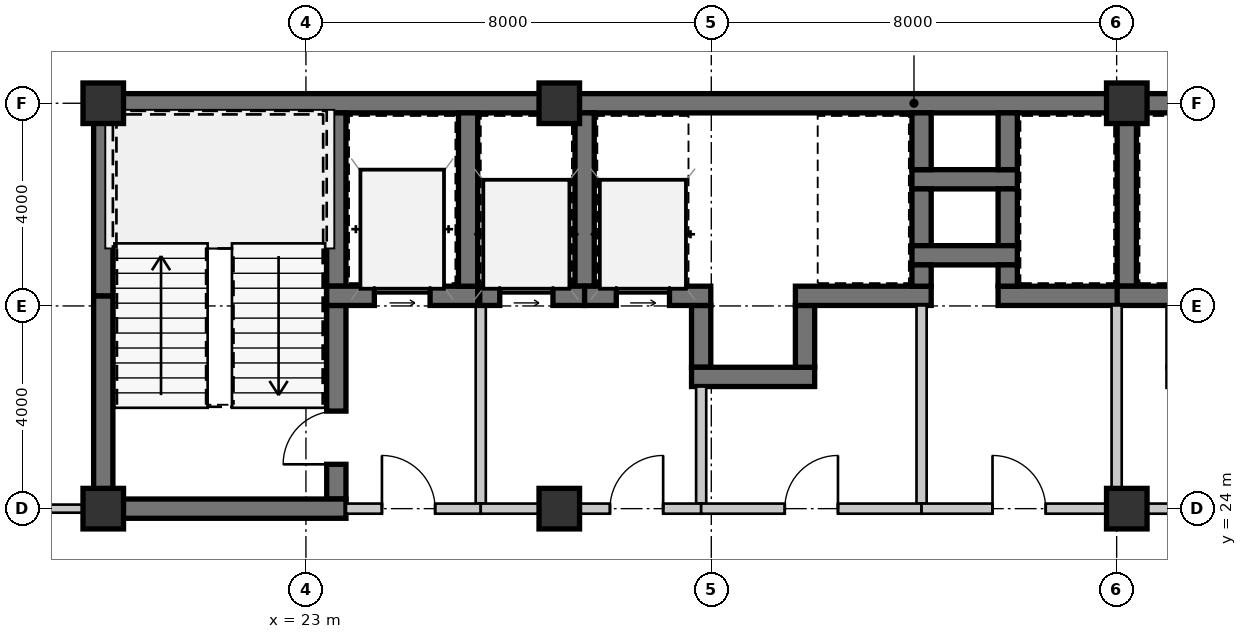
"""IFC4 building model, lengths in metres.
Left out: names, types, materials, properties, quantities, classifications, styles, units other than length and angle.
Written with IfcOpenShell. Run it as: python <this file> out.ifc"""

import sys

from ifc_helpers import new_model, si_unit, direction, frame, frame_2d, origin, origin_2d, place, context, subcontext, project, spatial, rectangle, extrude, source, transform, mapped, element, fill, save


model = new_model("IFC4")
c1 = context("Model", 3, precision=1e-05, world=origin(), true_north=direction((0.0, 1.0)))
c2 = subcontext(c1, "Body", "Model", "MODEL_VIEW")
j1 = project(units=[si_unit("LENGTHUNIT", "METRE"), si_unit("PLANEANGLEUNIT", "RADIAN")], contexts=[c1])
p1 = place(None, origin())
s1 = spatial("IfcSite", under=j1, at=p1, CompositionType="ELEMENT")
p2 = place(p1, origin())
s2 = spatial("IfcBuilding", under=s1, at=p2, CompositionType="ELEMENT")
p3 = place(p2, frame((0.0, 0.0, 19.95)))
s3 = spatial("IfcBuildingStorey", under=s2, at=p3, CompositionType="ELEMENT", Elevation=19.95)
m1 = source(origin(), c2, "Body", "SweptSolid", [
    extrude(rectangle(XDim=0.8, YDim=0.8, at=origin_2d()), origin(), (0.0, 0.0, 1.0), 3.15),
])
for number, where, z_axis, x_axis in (
    (1, (19.0, 24.0, 0.0), (0.0, 0.0, 1.0), (1.0, 0.0, 0.0)),
    (2, (28.0, 24.0, 0.0), (0.0, 0.0, 1.0), (1.0, 0.0, 0.0)),
    (3, (39.2, 24.0, 0.0), (0.0, 0.0, 1.0), (1.0, 0.0, 0.0)),
    (4, (19.0, 32.0, 0.0), (0.0, 0.0, 1.0), (1.0, 0.0, 0.0)),
    (5, (28.0, 32.0, 0.0), (0.0, 0.0, 1.0), (1.0, 0.0, 0.0)),
    (6, (39.2, 32.0, 0.0), (0.0, 0.0, 1.0), (1.0, 0.0, 0.0)),
):
    element("IfcColumn", number, at=place(p3, frame(where, z_axis=z_axis, x_axis=x_axis)), inside=s3, PredefinedType="COLUMN", context=c2, shape_type="MappedRepresentation", body=[
        mapped(m1, transform((0.0, 0.0, 0.0), scale=1.0)),
    ])
m2 = source(origin(), c2, "Body", "SweptSolid", [
    extrude(rectangle(XDim=9.19, YDim=0.38, at=frame_2d((4.595, 0.0))), origin(), (0.0, 0.0, 1.0), 2.93),
])
p4 = place(p3, frame((18.81, 32.0, 0.0), z_axis=(0.0, 0.0, 1.0), x_axis=(1.0, 0.0, 0.0)))
e7 = element("IfcWall", 7, at=p4, inside=s3, PredefinedType="SHEAR", context=c2, shape_type="MappedRepresentation", body=[
    mapped(m2, transform((0.0, 0.0, 0.0), scale=1.0)),
])
m3 = source(origin(), c2, "Body", "SweptSolid", [
    extrude(rectangle(XDim=11.2, YDim=0.38, at=frame_2d((5.6, 0.0))), origin(), (0.0, 0.0, 1.0), 2.93),
])
p5 = place(p3, frame((28.0, 32.0, 0.0), z_axis=(0.0, 0.0, 1.0), x_axis=(1.0, 0.0, 0.0)))
e8 = element("IfcWall", 8, at=p5, inside=s3, PredefinedType="SHEAR", context=c2, shape_type="MappedRepresentation", body=[
    mapped(m3, transform((0.0, 0.0, 0.0), scale=1.0)),
])
m4 = source(origin(), c2, "Body", "SweptSolid", [
    extrude(rectangle(XDim=11.99, YDim=0.38, at=frame_2d((5.995, 0.0))), origin(), (0.0, 0.0, 1.0), 2.93),
])
p6 = place(p3, frame((39.2, 32.0, 0.0), z_axis=(0.0, 0.0, 1.0), x_axis=(1.0, 0.0, 0.0)))
e9 = element("IfcWall", 9, at=p6, inside=s3, PredefinedType="SHEAR", context=c2, shape_type="MappedRepresentation", body=[
    mapped(m4, transform((0.0, 0.0, 0.0), scale=1.0)),
])
m5 = source(origin(), c2, "Body", "SweptSolid", [
    extrude(rectangle(XDim=4.01, YDim=0.38, at=frame_2d((2.005, 0.0))), origin(), (0.0, 0.0, 1.0), 2.93),
])
p7 = place(p3, frame((19.0, 24.19, 0.0), z_axis=(0.0, 0.0, 1.0), x_axis=(0.0, 1.0, 0.0)))
e10 = element("IfcWall", 10, at=p7, inside=s3, PredefinedType="SHEAR", context=c2, shape_type="MappedRepresentation", body=[
    mapped(m5, transform((0.0, 0.0, 0.0), scale=1.0)),
])
m6 = source(origin(), c2, "Body", "SweptSolid", [
    extrude(rectangle(XDim=3.61, YDim=0.38, at=frame_2d((1.805, 0.0))), origin(), (0.0, 0.0, 1.0), 2.93),
])
p8 = place(p3, frame((19.0, 28.2, 0.0), z_axis=(0.0, 0.0, 1.0), x_axis=(0.0, 1.0, 0.0)))
e11 = element("IfcWall", 11, at=p8, inside=s3, PredefinedType="SHEAR", context=c2, shape_type="MappedRepresentation", body=[
    mapped(m6, transform((0.0, 0.0, 0.0), scale=1.0)),
])
m7 = source(origin(), c2, "Body", "SweptSolid", [
    extrude(rectangle(XDim=3.42, YDim=0.38, at=frame_2d((1.71, 0.0))), origin(), (0.0, 0.0, 1.0), 2.93),
])
p9 = place(p3, frame((23.6, 28.39, 0.0), z_axis=(0.0, 0.0, 1.0), x_axis=(0.0, 1.0, 0.0)))
e12 = element("IfcWall", 12, at=p9, inside=s3, PredefinedType="SHEAR", context=c2, shape_type="MappedRepresentation", body=[
    mapped(m7, transform((0.0, 0.0, 0.0), scale=1.0)),
])
m8 = source(origin(), c2, "Body", "SweptSolid", [
    extrude(rectangle(XDim=3.82, YDim=0.38, at=frame_2d((1.91, 0.0))), origin(), (0.0, 0.0, 1.0), 2.93),
])
p10 = place(p3, frame((23.6, 24.19, 0.0), z_axis=(0.0, 0.0, 1.0), x_axis=(0.0, 1.0, 0.0)))
e13 = element("IfcWall", 13, at=p10, inside=s3, PredefinedType="SHEAR", context=c2, shape_type="MappedRepresentation", body=[
    mapped(m8, transform((0.0, 0.0, 0.0), scale=1.0)),
])
m9 = source(origin(), c2, "Body", "SweptSolid", [
    extrude(rectangle(XDim=1.05, YDim=2.1, at=frame_2d((0.525, 1.05))), frame((0.0, 0.2, 0.0), z_axis=(0.0, -1.0, 0.0), x_axis=(1.0, 0.0, 0.0)), (0.0, 0.0, 1.0), 0.4),
])
p11 = place(p10, frame((0.685, 0.0, 0.0)))
e14 = element("IfcOpeningElement", 14, at=p11, cuts=e13, PredefinedType="OPENING", context=c2, shape_type="MappedRepresentation", body=[
    mapped(m9, transform((0.0, 0.0, 0.0), scale=1.0)),
])
m10 = source(origin(), c2, "Body", "SweptSolid", [
    extrude(rectangle(XDim=4.98, YDim=0.38, at=frame_2d((2.49, 0.0))), origin(), (0.0, 0.0, 1.0), 2.93),
])
p12 = place(p3, frame((18.81, 24.0, 0.0), z_axis=(0.0, 0.0, 1.0), x_axis=(1.0, 0.0, 0.0)))
e15 = element("IfcWall", 15, at=p12, inside=s3, PredefinedType="SHEAR", context=c2, shape_type="MappedRepresentation", body=[
    mapped(m10, transform((0.0, 0.0, 0.0), scale=1.0)),
])
m11 = source(origin(), c2, "Body", "SweptSolid", [
    extrude(rectangle(XDim=2.98, YDim=0.38, at=frame_2d((1.49, 0.0))), origin(), (0.0, 0.0, 1.0), 2.93),
])
p13 = place(p3, frame((23.41, 28.2, 0.0), z_axis=(0.0, 0.0, 1.0), x_axis=(1.0, 0.0, 0.0)))
e16 = element("IfcWall", 16, at=p13, inside=s3, PredefinedType="SHEAR", context=c2, shape_type="MappedRepresentation", body=[
    mapped(m11, transform((0.0, 0.0, 0.0), scale=1.0)),
])
m12 = source(origin(), c2, "Body", "SweptSolid", [
    extrude(rectangle(XDim=1.1, YDim=2.15, at=frame_2d((0.55, 1.075))), frame((0.0, 0.2, 0.0), z_axis=(0.0, -1.0, 0.0), x_axis=(1.0, 0.0, 0.0)), (0.0, 0.0, 1.0), 0.4),
])
p14 = place(p13, frame((0.94, 0.0, 0.0)))
e17 = element("IfcOpeningElement", 17, at=p14, cuts=e16, PredefinedType="OPENING", context=c2, shape_type="MappedRepresentation", body=[
    mapped(m12, transform((0.0, 0.0, 0.0), scale=1.0)),
])
p15 = place(p3, frame((26.2, 28.39, 0.0), z_axis=(0.0, 0.0, 1.0), x_axis=(0.0, 1.0, 0.0)))
e18 = element("IfcWall", 18, at=p15, inside=s3, PredefinedType="SHEAR", context=c2, shape_type="MappedRepresentation", body=[
    mapped(m7, transform((0.0, 0.0, 0.0), scale=1.0)),
])
m13 = source(origin(), c2, "Body", "SweptSolid", [
    extrude(rectangle(XDim=3.91, YDim=0.2, at=frame_2d((1.955, 0.0))), origin(), (0.0, 0.0, 1.0), 2.93),
])
p16 = place(p3, frame((26.45, 24.1, 0.0), z_axis=(0.0, 0.0, 1.0), x_axis=(0.0, 1.0, 0.0)))
e19 = element("IfcWall", 19, at=p16, inside=s3, PredefinedType="SOLIDWALL", context=c2, shape_type="MappedRepresentation", body=[
    mapped(m13, transform((0.0, 0.0, 0.0), scale=1.0)),
])
m14 = source(origin(), c2, "Body", "SweptSolid", [
    extrude(rectangle(XDim=2.66, YDim=0.2, at=frame_2d((1.33, 0.0))), origin(), (0.0, 0.0, 1.0), 2.47),
])
p17 = place(p3, frame((23.79, 24.0, 0.0), z_axis=(0.0, 0.0, 1.0), x_axis=(1.0, 0.0, 0.0)))
e20 = element("IfcWall", 20, at=p17, inside=s3, PredefinedType="SOLIDWALL", context=c2, shape_type="MappedRepresentation", body=[
    mapped(m14, transform((0.0, 0.0, 0.0), scale=1.0)),
])
m15 = source(origin(), c2, "Body", "SweptSolid", [
    extrude(rectangle(XDim=1.05, YDim=2.1, at=frame_2d((0.525, 1.05))), frame((0.0, 0.11, 0.0), z_axis=(0.0, -1.0, 0.0), x_axis=(1.0, 0.0, 0.0)), (0.0, 0.0, 1.0), 0.22),
])
p18 = place(p17, frame((0.71, 0.0, 0.0)))
e21 = element("IfcOpeningElement", 21, at=p18, cuts=e20, PredefinedType="OPENING", context=c2, shape_type="MappedRepresentation", body=[
    mapped(m15, transform((0.0, 0.0, 0.0), scale=1.0)),
])
m16 = source(origin(), c2, "Body", "SweptSolid", [
    extrude(rectangle(XDim=2.08, YDim=0.38, at=frame_2d((1.04, 0.0))), origin(), (0.0, 0.0, 1.0), 2.93),
])
p19 = place(p3, frame((34.96, 30.5, 0.0), z_axis=(0.0, 0.0, 1.0), x_axis=(1.0, 0.0, 0.0)))
e22 = element("IfcWall", 22, at=p19, inside=s3, PredefinedType="SHEAR", context=c2, shape_type="MappedRepresentation", body=[
    mapped(m16, transform((0.0, 0.0, 0.0), scale=1.0)),
])
m17 = source(origin(), c2, "Body", "SweptSolid", [
    extrude(rectangle(XDim=1.12, YDim=0.38, at=frame_2d((0.56, 0.0))), origin(), (0.0, 0.0, 1.0), 2.93),
])
for number, where, z_axis, x_axis in (
    (23, (35.15, 31.81, 0.0), (0.0, 0.0, 1.0), (0.0, -1.0, 0.0)),
    (24, (36.85, 30.69, 0.0), (0.0, 0.0, 1.0), (0.0, 1.0, 0.0)),
    (25, (35.15, 30.31, 0.0), (0.0, 0.0, 1.0), (0.0, -1.0, 0.0)),
    (26, (36.85, 29.19, 0.0), (0.0, 0.0, 1.0), (0.0, 1.0, 0.0)),
):
    element("IfcWall", number, at=place(p3, frame(where, z_axis=z_axis, x_axis=x_axis)), inside=s3, PredefinedType="SHEAR", context=c2, shape_type="MappedRepresentation", body=[
        mapped(m17, transform((0.0, 0.0, 0.0), scale=1.0)),
    ])
p20 = place(p3, frame((34.96, 29.0, 0.0), z_axis=(0.0, 0.0, 1.0), x_axis=(1.0, 0.0, 0.0)))
e27 = element("IfcWall", 27, at=p20, inside=s3, PredefinedType="SHEAR", context=c2, shape_type="MappedRepresentation", body=[
    mapped(m16, transform((0.0, 0.0, 0.0), scale=1.0)),
])
m18 = source(origin(), c2, "Body", "SweptSolid", [
    extrude(rectangle(XDim=1.22, YDim=0.38, at=frame_2d((0.61, 0.0))), origin(), (0.0, 0.0, 1.0), 2.93),
])
p21 = place(p3, frame((30.8, 28.01, 0.0), z_axis=(0.0, 0.0, 1.0), x_axis=(0.0, -1.0, 0.0)))
e28 = element("IfcWall", 28, at=p21, inside=s3, PredefinedType="SHEAR", context=c2, shape_type="MappedRepresentation", body=[
    mapped(m18, transform((0.0, 0.0, 0.0), scale=1.0)),
])
m19 = source(origin(), c2, "Body", "SweptSolid", [
    extrude(rectangle(XDim=2.43, YDim=0.38, at=frame_2d((1.215, 0.0))), origin(), (0.0, 0.0, 1.0), 2.93),
])
p22 = place(p3, frame((30.61, 26.6, 0.0), z_axis=(0.0, 0.0, 1.0), x_axis=(1.0, 0.0, 0.0)))
e29 = element("IfcWall", 29, at=p22, inside=s3, PredefinedType="SHEAR", context=c2, shape_type="MappedRepresentation", body=[
    mapped(m19, transform((0.0, 0.0, 0.0), scale=1.0)),
])
p23 = place(p3, frame((32.85, 26.79, 0.0), z_axis=(0.0, 0.0, 1.0), x_axis=(0.0, 1.0, 0.0)))
e30 = element("IfcWall", 30, at=p23, inside=s3, PredefinedType="SHEAR", context=c2, shape_type="MappedRepresentation", body=[
    mapped(m18, transform((0.0, 0.0, 0.0), scale=1.0)),
])
p24 = place(p3, frame((28.5, 28.39, 0.0), z_axis=(0.0, 0.0, 1.0), x_axis=(0.0, 1.0, 0.0)))
e31 = element("IfcWall", 31, at=p24, inside=s3, PredefinedType="SHEAR", context=c2, shape_type="MappedRepresentation", body=[
    mapped(m7, transform((0.0, 0.0, 0.0), scale=1.0)),
])
m20 = source(origin(), c2, "Body", "SweptSolid", [
    extrude(rectangle(XDim=2.07, YDim=0.38, at=frame_2d((1.035, 0.0))), origin(), (0.0, 0.0, 1.0), 2.93),
])
p25 = place(p3, frame((26.43, 28.2, 0.0), z_axis=(0.0, 0.0, 1.0), x_axis=(1.0, 0.0, 0.0)))
e32 = element("IfcWall", 32, at=p25, inside=s3, PredefinedType="SHEAR", context=c2, shape_type="MappedRepresentation", body=[
    mapped(m20, transform((0.0, 0.0, 0.0), scale=1.0)),
])
m21 = source(origin(), c2, "Body", "SweptSolid", [
    extrude(rectangle(XDim=1.05, YDim=2.15, at=frame_2d((0.525, 1.075))), frame((0.0, 0.2, 0.0), z_axis=(0.0, -1.0, 0.0), x_axis=(1.0, 0.0, 0.0)), (0.0, 0.0, 1.0), 0.4),
])
p26 = place(p25, frame((0.395, 0.0, 0.0)))
e33 = element("IfcOpeningElement", 33, at=p26, cuts=e32, PredefinedType="OPENING", context=c2, shape_type="MappedRepresentation", body=[
    mapped(m21, transform((0.0, 0.0, 0.0), scale=1.0)),
])
m22 = source(origin(), c2, "Body", "SweptSolid", [
    extrude(rectangle(XDim=2.49, YDim=0.38, at=frame_2d((1.245, 0.0))), origin(), (0.0, 0.0, 1.0), 2.93),
])
p27 = place(p3, frame((28.5, 28.2, 0.0), z_axis=(0.0, 0.0, 1.0), x_axis=(1.0, 0.0, 0.0)))
e34 = element("IfcWall", 34, at=p27, inside=s3, PredefinedType="SHEAR", context=c2, shape_type="MappedRepresentation", body=[
    mapped(m22, transform((0.0, 0.0, 0.0), scale=1.0)),
])
p28 = place(p27, frame((0.625, 0.0, 0.0)))
e35 = element("IfcOpeningElement", 35, at=p28, cuts=e34, PredefinedType="OPENING", context=c2, shape_type="MappedRepresentation", body=[
    mapped(m21, transform((0.0, 0.0, 0.0), scale=1.0)),
])
m23 = source(origin(), c2, "Body", "SweptSolid", [
    extrude(rectangle(XDim=2.31, YDim=0.2, at=frame_2d((1.155, 0.0))), origin(), (0.0, 0.0, 1.0), 2.93),
])
p29 = place(p3, frame((30.8, 26.41, 0.0), z_axis=(0.0, 0.0, 1.0), x_axis=(0.0, -1.0, 0.0)))
e36 = element("IfcWall", 36, at=p29, inside=s3, PredefinedType="SOLIDWALL", context=c2, shape_type="MappedRepresentation", body=[
    mapped(m23, transform((0.0, 0.0, 0.0), scale=1.0)),
])
m24 = source(origin(), c2, "Body", "SweptSolid", [
    extrude(rectangle(XDim=4.35, YDim=0.2, at=frame_2d((2.175, 0.0))), origin(), (0.0, 0.0, 1.0), 2.47),
])
p30 = place(p3, frame((30.8, 24.0, 0.0), z_axis=(0.0, 0.0, 1.0), x_axis=(-1.0, 0.0, 0.0)))
e37 = element("IfcWall", 37, at=p30, inside=s3, PredefinedType="SOLIDWALL", context=c2, shape_type="MappedRepresentation", body=[
    mapped(m24, transform((0.0, 0.0, 0.0), scale=1.0)),
])
p31 = place(p30, frame((0.75, 0.0, 0.0)))
e38 = element("IfcOpeningElement", 38, at=p31, cuts=e37, PredefinedType="OPENING", context=c2, shape_type="MappedRepresentation", body=[
    mapped(m15, transform((0.0, 0.0, 0.0), scale=1.0)),
])
m25 = source(origin(), c2, "Body", "SweptSolid", [
    extrude(rectangle(XDim=2.68, YDim=0.38, at=frame_2d((1.34, 0.0))), origin(), (0.0, 0.0, 1.0), 2.93),
])
p32 = place(p3, frame((32.66, 28.2, 0.0), z_axis=(0.0, 0.0, 1.0), x_axis=(1.0, 0.0, 0.0)))
e39 = element("IfcWall", 39, at=p32, inside=s3, PredefinedType="SHEAR", context=c2, shape_type="MappedRepresentation", body=[
    mapped(m25, transform((0.0, 0.0, 0.0), scale=1.0)),
])
m26 = source(origin(), c2, "Body", "SweptSolid", [
    extrude(rectangle(XDim=0.42, YDim=0.38, at=frame_2d((0.21, 0.0))), origin(), (0.0, 0.0, 1.0), 2.93),
])
p33 = place(p3, frame((35.15, 28.39, 0.0), z_axis=(0.0, 0.0, 1.0), x_axis=(0.0, 1.0, 0.0)))
e40 = element("IfcWall", 40, at=p33, inside=s3, PredefinedType="SHEAR", context=c2, shape_type="MappedRepresentation", body=[
    mapped(m26, transform((0.0, 0.0, 0.0), scale=1.0)),
])
p34 = place(p3, frame((39.2, 28.39, 0.0), z_axis=(0.0, 0.0, 1.0), x_axis=(0.0, 1.0, 0.0)))
e41 = element("IfcWall", 41, at=p34, inside=s3, PredefinedType="SHEAR", context=c2, shape_type="MappedRepresentation", body=[
    mapped(m7, transform((0.0, 0.0, 0.0), scale=1.0)),
])
m27 = source(origin(), c2, "Body", "SweptSolid", [
    extrude(rectangle(XDim=2.36, YDim=0.38, at=frame_2d((1.18, 0.0))), origin(), (0.0, 0.0, 1.0), 2.93),
])
p35 = place(p3, frame((36.66, 28.2, 0.0), z_axis=(0.0, 0.0, 1.0), x_axis=(1.0, 0.0, 0.0)))
e42 = element("IfcWall", 42, at=p35, inside=s3, PredefinedType="SHEAR", context=c2, shape_type="MappedRepresentation", body=[
    mapped(m27, transform((0.0, 0.0, 0.0), scale=1.0)),
])
p36 = place(p3, frame((36.85, 28.81, 0.0), z_axis=(0.0, 0.0, 1.0), x_axis=(0.0, -1.0, 0.0)))
e43 = element("IfcWall", 43, at=p36, inside=s3, PredefinedType="SHEAR", context=c2, shape_type="MappedRepresentation", body=[
    mapped(m26, transform((0.0, 0.0, 0.0), scale=1.0)),
])
m28 = source(origin(), c2, "Body", "SweptSolid", [
    extrude(rectangle(XDim=1.21, YDim=0.38, at=frame_2d((0.605, 0.0))), origin(), (0.0, 0.0, 1.0), 2.93),
])
p37 = place(p3, frame((39.01, 28.2, 0.0), z_axis=(0.0, 0.0, 1.0), x_axis=(1.0, 0.0, 0.0)))
e44 = element("IfcWall", 44, at=p37, inside=s3, PredefinedType="SHEAR", context=c2, shape_type="MappedRepresentation", body=[
    mapped(m28, transform((0.0, 0.0, 0.0), scale=1.0)),
])
p38 = place(p3, frame((35.15, 28.01, 0.0), z_axis=(0.0, 0.0, 1.0), x_axis=(0.0, -1.0, 0.0)))
e45 = element("IfcWall", 45, at=p38, inside=s3, PredefinedType="SOLIDWALL", context=c2, shape_type="MappedRepresentation", body=[
    mapped(m13, transform((0.0, 0.0, 0.0), scale=1.0)),
])
m29 = source(origin(), c2, "Body", "SweptSolid", [
    extrude(rectangle(XDim=4.35, YDim=0.2, at=frame_2d((2.175, 0.0))), origin(), (0.0, 0.0, 1.0), 2.47),
])
p39 = place(p3, frame((35.15, 24.0, 0.0), z_axis=(0.0, 0.0, 1.0), x_axis=(-1.0, 0.0, 0.0)))
e46 = element("IfcWall", 46, at=p39, inside=s3, PredefinedType="SOLIDWALL", context=c2, shape_type="MappedRepresentation", body=[
    mapped(m29, transform((0.0, 0.0, 0.0), scale=1.0)),
])
p40 = place(p39, frame((1.65, 0.0, 0.0)))
e47 = element("IfcOpeningElement", 47, at=p40, cuts=e46, PredefinedType="OPENING", context=c2, shape_type="MappedRepresentation", body=[
    mapped(m15, transform((0.0, 0.0, 0.0), scale=1.0)),
])
p41 = place(p3, frame((39.0, 28.01, 0.0), z_axis=(0.0, 0.0, 1.0), x_axis=(0.0, -1.0, 0.0)))
e48 = element("IfcWall", 48, at=p41, inside=s3, PredefinedType="SOLIDWALL", context=c2, shape_type="MappedRepresentation", body=[
    mapped(m13, transform((0.0, 0.0, 0.0), scale=1.0)),
])
m30 = source(origin(), c2, "Body", "SweptSolid", [
    extrude(rectangle(XDim=3.85, YDim=0.2, at=frame_2d((1.925, 0.0))), origin(), (0.0, 0.0, 1.0), 2.47),
])
p42 = place(p3, frame((39.0, 24.0, 0.0), z_axis=(0.0, 0.0, 1.0), x_axis=(-1.0, 0.0, 0.0)))
e49 = element("IfcWall", 49, at=p42, inside=s3, PredefinedType="SOLIDWALL", context=c2, shape_type="MappedRepresentation", body=[
    mapped(m30, transform((0.0, 0.0, 0.0), scale=1.0)),
])
p43 = place(p42, frame((1.4, 0.0, 0.0)))
e50 = element("IfcOpeningElement", 50, at=p43, cuts=e49, PredefinedType="OPENING", context=c2, shape_type="MappedRepresentation", body=[
    mapped(m15, transform((0.0, 0.0, 0.0), scale=1.0)),
])
m31 = source(origin(), c2, "Body", "SweptSolid", [
    extrude(rectangle(XDim=4.55, YDim=0.2, at=frame_2d((2.275, 0.0))), origin(), (0.0, 0.0, 1.0), 2.397),
])
p44 = place(p3, frame((43.55, 24.0, 0.0), z_axis=(0.0, 0.0, 1.0), x_axis=(-1.0, 0.0, 0.0)))
e51 = element("IfcWall", 51, at=p44, inside=s3, PredefinedType="SOLIDWALL", context=c2, shape_type="MappedRepresentation", body=[
    mapped(m31, transform((0.0, 0.0, 0.0), scale=1.0)),
])
p45 = place(p44, frame((1.75, 0.0, 0.0)))
e52 = element("IfcOpeningElement", 52, at=p45, cuts=e51, PredefinedType="OPENING", context=c2, shape_type="MappedRepresentation", body=[
    mapped(m15, transform((0.0, 0.0, 0.0), scale=1.0)),
])
m32 = source(origin(), c2, "Body", "SweptSolid", [
    extrude(rectangle(XDim=4.13, YDim=0.16, at=frame_2d((2.065, 0.0))), origin(), (0.0, 0.0, 1.0), 2.93),
])
p46 = place(p3, frame((14.68, 24.0, 0.0), z_axis=(0.0, 0.0, 1.0), x_axis=(1.0, 0.0, 0.0)))
e53 = element("IfcWall", 53, at=p46, inside=s3, PredefinedType="PARTITIONING", context=c2, shape_type="MappedRepresentation", body=[
    mapped(m32, transform((0.0, 0.0, 0.0), scale=1.0)),
])
m33 = source(origin(), c2, "Body", "SweptSolid", [
    extrude(rectangle(XDim=0.92, YDim=2.1, at=frame_2d((0.46, 1.05))), frame((0.0, 0.09, 0.0), z_axis=(0.0, -1.0, 0.0), x_axis=(1.0, 0.0, 0.0)), (0.0, 0.0, 1.0), 0.18),
])
p47 = place(p46, frame((1.69, 0.0, 0.0)))
e54 = element("IfcOpeningElement", 54, at=p47, cuts=e53, PredefinedType="OPENING", context=c2, shape_type="MappedRepresentation", body=[
    mapped(m33, transform((0.0, 0.0, 0.0), scale=1.0)),
])
m34 = source(origin(), c2, "Body", "SweptSolid", [
    extrude(rectangle(XDim=1.05, YDim=2.1, at=frame_2d((0.525, 1.05))), frame((0.0, 0.025, 0.0), z_axis=(0.0, -1.0, 0.0), x_axis=(1.0, 0.0, 0.0)), (0.0, 0.0, 1.0), 0.05),
])
p48 = place(p11, origin())
e55 = element("IfcDoor", 55, at=p48, inside=s3, OperationType="SINGLE_SWING_LEFT", PredefinedType="DOOR", context=c2, shape_type="MappedRepresentation", body=[
    mapped(m34, transform((0.0, 0.0, 0.0), scale=1.0)),
])
fill(e14, e55)
m35 = source(origin(), c2, "Body", "SweptSolid", [
    extrude(rectangle(XDim=1.1, YDim=2.15, at=frame_2d((0.55, 1.075))), frame((0.0, 0.025, 0.0), z_axis=(0.0, -1.0, 0.0), x_axis=(1.0, 0.0, 0.0)), (0.0, 0.0, 1.0), 0.05),
])
p49 = place(p14, origin())
e56 = element("IfcDoor", 56, at=p49, inside=s3, OperationType="SLIDING_TO_LEFT", PredefinedType="DOOR", context=c2, shape_type="MappedRepresentation", body=[
    mapped(m35, transform((0.0, 0.0, 0.0), scale=1.0)),
])
fill(e17, e56)
p50 = place(p18, origin())
e57 = element("IfcDoor", 57, at=p50, inside=s3, OperationType="SINGLE_SWING_LEFT", PredefinedType="DOOR", context=c2, shape_type="MappedRepresentation", body=[
    mapped(m34, transform((0.0, 0.0, 0.0), scale=1.0)),
])
fill(e21, e57)
m36 = source(origin(), c2, "Body", "SweptSolid", [
    extrude(rectangle(XDim=1.05, YDim=2.15, at=frame_2d((0.525, 1.075))), frame((0.0, 0.025, 0.0), z_axis=(0.0, -1.0, 0.0), x_axis=(1.0, 0.0, 0.0)), (0.0, 0.0, 1.0), 0.05),
])
p51 = place(p26, origin())
e58 = element("IfcDoor", 58, at=p51, inside=s3, OperationType="SLIDING_TO_LEFT", PredefinedType="DOOR", context=c2, shape_type="MappedRepresentation", body=[
    mapped(m36, transform((0.0, 0.0, 0.0), scale=1.0)),
])
fill(e33, e58)
p52 = place(p28, origin())
e59 = element("IfcDoor", 59, at=p52, inside=s3, OperationType="SLIDING_TO_LEFT", PredefinedType="DOOR", context=c2, shape_type="MappedRepresentation", body=[
    mapped(m36, transform((0.0, 0.0, 0.0), scale=1.0)),
])
fill(e35, e59)
p53 = place(p31, frame((1.05, 0.0, 0.0), z_axis=(0.0, 0.0, 1.0), x_axis=(-1.0, 0.0, 0.0)))
e60 = element("IfcDoor", 60, at=p53, inside=s3, OperationType="SINGLE_SWING_RIGHT", PredefinedType="DOOR", context=c2, shape_type="MappedRepresentation", body=[
    mapped(m34, transform((0.0, 0.0, 0.0), scale=1.0)),
])
fill(e38, e60)
p54 = place(p40, frame((1.05, 0.0, 0.0), z_axis=(0.0, 0.0, 1.0), x_axis=(-1.0, 0.0, 0.0)))
e61 = element("IfcDoor", 61, at=p54, inside=s3, OperationType="SINGLE_SWING_RIGHT", PredefinedType="DOOR", context=c2, shape_type="MappedRepresentation", body=[
    mapped(m34, transform((0.0, 0.0, 0.0), scale=1.0)),
])
fill(e47, e61)
p55 = place(p43, frame((1.05, 0.0, 0.0), z_axis=(0.0, 0.0, 1.0), x_axis=(-1.0, 0.0, 0.0)))
e62 = element("IfcDoor", 62, at=p55, inside=s3, OperationType="SINGLE_SWING_LEFT", PredefinedType="DOOR", context=c2, shape_type="MappedRepresentation", body=[
    mapped(m34, transform((0.0, 0.0, 0.0), scale=1.0)),
])
fill(e50, e62)
save(model, sys.argv[1])
